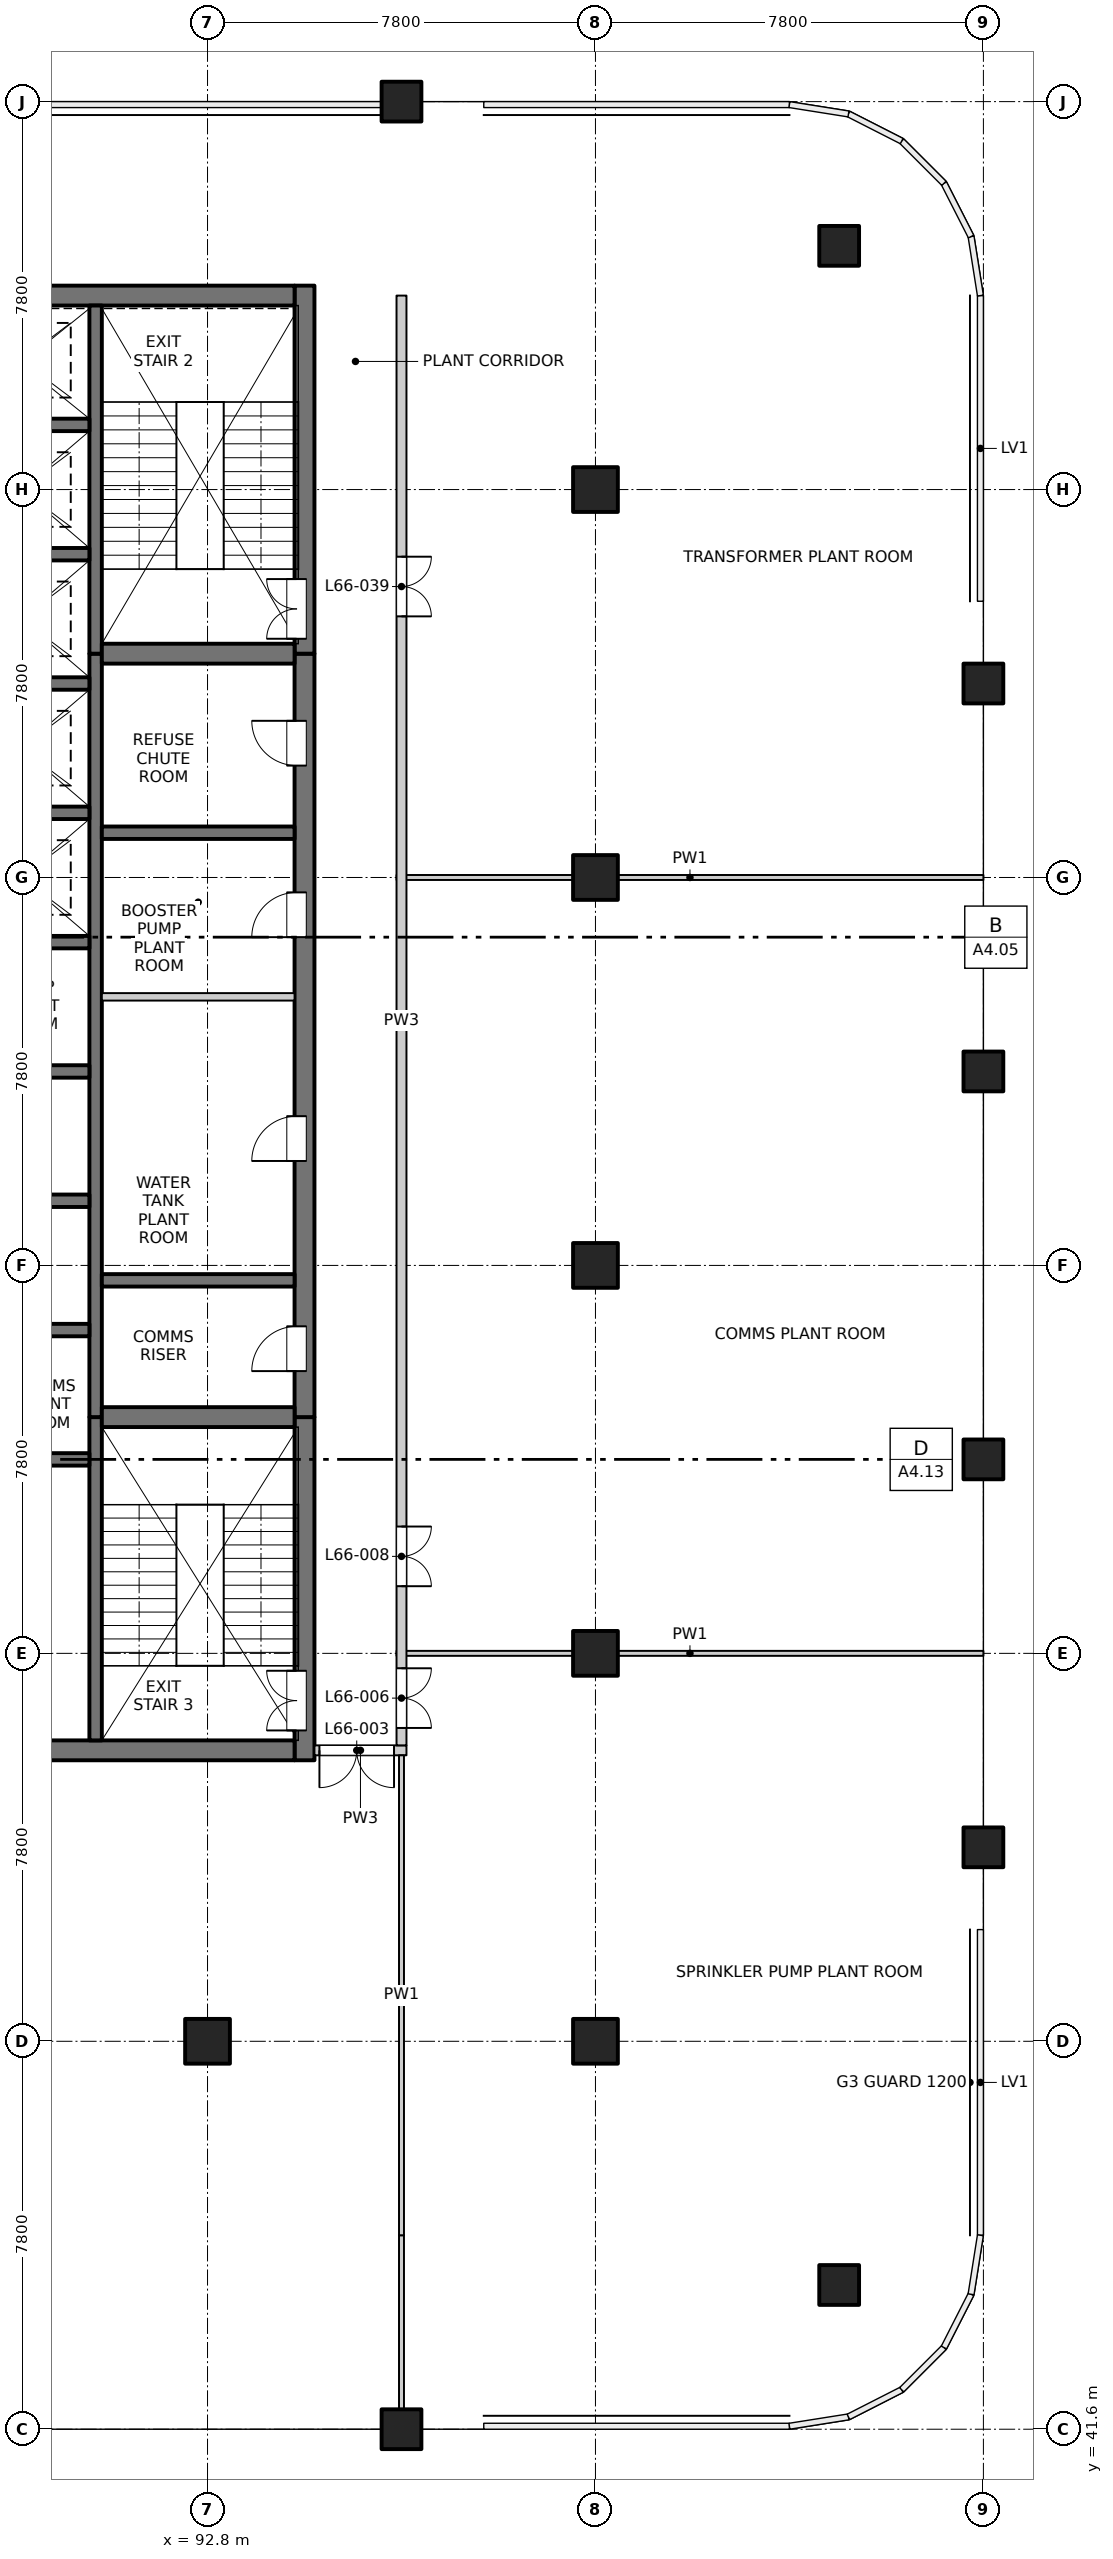
"""IFC4 building model, lengths in metres.
Left out: names, types, materials, properties, quantities, classifications, styles, units other than length and angle.
Written with IfcOpenShell. Run it as: python <this file> out.ifc"""

import sys

from ifc_helpers import new_model, si_unit, direction, frame, frame_2d, origin, origin_2d, place, context, subcontext, project, spatial, rectangle, extrude, element, fill, save


model = new_model("IFC4")
c1 = context("Model", 3, precision=1e-05, world=origin(), true_north=direction((0.0, 1.0)))
c2 = subcontext(c1, "Body", "Model", "MODEL_VIEW")
j1 = project(units=[si_unit("LENGTHUNIT", "METRE"), si_unit("PLANEANGLEUNIT", "RADIAN")], contexts=[c1])
p1 = place(None, origin())
s1 = spatial("IfcSite", under=j1, at=p1, CompositionType="ELEMENT")
p2 = place(p1, origin())
s2 = spatial("IfcBuilding", under=s1, at=p2, CompositionType="ELEMENT")
p3 = place(p2, frame((0.0, 0.0, 241.5)))
s3 = spatial("IfcBuildingStorey", under=s2, at=p3, CompositionType="ELEMENT", Elevation=241.5)
for number, where, z_axis, x_axis in (
    (1, (105.5, 44.5, -0.3), (0.0, 0.0, 1.0), (1.0, 0.0, 0.0)),
    (2, (105.5, 85.5, -0.3), (0.0, 0.0, 1.0), (1.0, 0.0, 0.0)),
    (3, (108.4, 53.3, -0.3), (0.0, 0.0, 1.0), (1.0, 0.0, 0.0)),
    (4, (108.4, 61.1, -0.3), (0.0, 0.0, 1.0), (1.0, 0.0, 0.0)),
    (5, (108.4, 68.9, -0.3), (0.0, 0.0, 1.0), (1.0, 0.0, 0.0)),
    (6, (108.4, 76.7, -0.3), (0.0, 0.0, 1.0), (1.0, 0.0, 0.0)),
    (7, (96.7, 41.6, -0.3), (0.0, 0.0, 1.0), (1.0, 0.0, 0.0)),
    (8, (96.7, 88.4, -0.3), (0.0, 0.0, 1.0), (1.0, 0.0, 0.0)),
):
    element("IfcColumn", number, at=place(p3, frame(where, z_axis=z_axis, x_axis=x_axis)), inside=s3, PredefinedType="COLUMN", context=c2, shape_type="SweptSolid", body=[
        extrude(rectangle(XDim=0.8, YDim=0.8, at=origin_2d()), origin(), (0.0, 0.0, 1.0), 4.5),
    ])
for number, where, z_axis, x_axis in (
    (9, (92.8, 49.4, -0.3), (0.0, 0.0, 1.0), (1.0, 0.0, 0.0)),
    (10, (100.6, 49.4, -0.3), (0.0, 0.0, 1.0), (1.0, 0.0, 0.0)),
    (11, (100.6, 57.2, -0.3), (0.0, 0.0, 1.0), (1.0, 0.0, 0.0)),
    (12, (100.6, 65.0, -0.3), (0.0, 0.0, 1.0), (1.0, 0.0, 0.0)),
    (13, (100.6, 72.8, -0.3), (0.0, 0.0, 1.0), (1.0, 0.0, 0.0)),
    (14, (100.6, 80.6, -0.3), (0.0, 0.0, 1.0), (1.0, 0.0, 0.0)),
):
    element("IfcColumn", number, at=place(p3, frame(where, z_axis=z_axis, x_axis=x_axis)), inside=s3, PredefinedType="COLUMN", context=c2, shape_type="SweptSolid", body=[
        extrude(rectangle(XDim=0.9, YDim=0.9, at=origin_2d()), origin(), (0.0, 0.0, 1.0), 4.5),
    ])
p4 = place(p3, frame((94.75, 55.05, -0.3), z_axis=(0.0, 0.0, 1.0), x_axis=(0.0, 1.0, 0.0)))
e15 = element("IfcWall", 15, at=p4, inside=s3, PredefinedType="SOLIDWALL", context=c2, shape_type="SweptSolid", body=[
    extrude(rectangle(XDim=6.9, YDim=0.4, at=frame_2d((3.45, 0.0))), origin(), (0.0, 0.0, 1.0), 4.5),
])
p5 = place(p4, frame((0.6, 0.0, 0.3)))
e16 = element("IfcOpeningElement", 16, at=p5, cuts=e15, PredefinedType="OPENING", context=c2, shape_type="SweptSolid", body=[
    extrude(rectangle(XDim=1.2, YDim=2.1, at=frame_2d((0.6, 1.05))), frame((0.0, 0.21, 0.0), z_axis=(0.0, -1.0, 0.0), x_axis=(1.0, 0.0, 0.0)), (0.0, 0.0, 1.0), 0.42),
])
p6 = place(p3, frame((94.75, 61.95, -0.3), z_axis=(0.0, 0.0, 1.0), x_axis=(0.0, 1.0, 0.0)))
e17 = element("IfcWall", 17, at=p6, inside=s3, PredefinedType="SOLIDWALL", context=c2, shape_type="SweptSolid", body=[
    extrude(rectangle(XDim=15.35, YDim=0.4, at=frame_2d((7.675, 0.0))), origin(), (0.0, 0.0, 1.0), 4.5),
])
p7 = place(p6, frame((0.925, 0.0, 0.3)))
e18 = element("IfcOpeningElement", 18, at=p7, cuts=e17, PredefinedType="OPENING", context=c2, shape_type="SweptSolid", body=[
    extrude(rectangle(XDim=0.9, YDim=2.1, at=frame_2d((0.45, 1.05))), frame((0.0, 0.21, 0.0), z_axis=(0.0, -1.0, 0.0), x_axis=(1.0, 0.0, 0.0)), (0.0, 0.0, 1.0), 0.42),
])
p8 = place(p6, frame((5.15, 0.0, 0.3)))
e19 = element("IfcOpeningElement", 19, at=p8, cuts=e17, PredefinedType="OPENING", context=c2, shape_type="SweptSolid", body=[
    extrude(rectangle(XDim=0.9, YDim=2.1, at=frame_2d((0.45, 1.05))), frame((0.0, 0.21, 0.0), z_axis=(0.0, -1.0, 0.0), x_axis=(1.0, 0.0, 0.0)), (0.0, 0.0, 1.0), 0.42),
])
p9 = place(p6, frame((9.65, 0.0, 0.3)))
e20 = element("IfcOpeningElement", 20, at=p9, cuts=e17, PredefinedType="OPENING", context=c2, shape_type="SweptSolid", body=[
    extrude(rectangle(XDim=0.9, YDim=2.1, at=frame_2d((0.45, 1.05))), frame((0.0, 0.21, 0.0), z_axis=(0.0, -1.0, 0.0), x_axis=(1.0, 0.0, 0.0)), (0.0, 0.0, 1.0), 0.42),
])
p10 = place(p6, frame((13.1, 0.0, 0.3)))
e21 = element("IfcOpeningElement", 21, at=p10, cuts=e17, PredefinedType="OPENING", context=c2, shape_type="SweptSolid", body=[
    extrude(rectangle(XDim=0.9, YDim=2.1, at=frame_2d((0.45, 1.05))), frame((0.0, 0.21, 0.0), z_axis=(0.0, -1.0, 0.0), x_axis=(1.0, 0.0, 0.0)), (0.0, 0.0, 1.0), 0.42),
])
p11 = place(p3, frame((94.75, 77.3, -0.3), z_axis=(0.0, 0.0, 1.0), x_axis=(0.0, 1.0, 0.0)))
e22 = element("IfcWall", 22, at=p11, inside=s3, PredefinedType="SOLIDWALL", context=c2, shape_type="SweptSolid", body=[
    extrude(rectangle(XDim=7.4, YDim=0.4, at=frame_2d((3.7, 0.0))), origin(), (0.0, 0.0, 1.0), 4.5),
])
p12 = place(p11, frame((0.3, 0.0, 0.3)))
e23 = element("IfcOpeningElement", 23, at=p12, cuts=e22, PredefinedType="OPENING", context=c2, shape_type="SweptSolid", body=[
    extrude(rectangle(XDim=1.2, YDim=2.1, at=frame_2d((0.6, 1.05))), frame((0.0, 0.21, 0.0), z_axis=(0.0, -1.0, 0.0), x_axis=(1.0, 0.0, 0.0)), (0.0, 0.0, 1.0), 0.42),
])
p13 = place(p3, frame((75.45, 55.25, -0.3), z_axis=(0.0, 0.0, 1.0), x_axis=(1.0, 0.0, 0.0)))
e24 = element("IfcWall", 24, at=p13, inside=s3, PredefinedType="SOLIDWALL", context=c2, shape_type="SweptSolid", body=[
    extrude(rectangle(XDim=19.1, YDim=0.4, at=frame_2d((9.55, 0.0))), origin(), (0.0, 0.0, 1.0), 4.5),
])
p14 = place(p13, frame((7.3, 0.0, 0.3)))
e25 = element("IfcOpeningElement", 25, at=p14, cuts=e24, PredefinedType="OPENING", context=c2, shape_type="SweptSolid", body=[
    extrude(rectangle(XDim=1.5, YDim=2.1, at=frame_2d((0.75, 1.05))), frame((0.0, 0.21, 0.0), z_axis=(0.0, -1.0, 0.0), x_axis=(1.0, 0.0, 0.0)), (0.0, 0.0, 1.0), 0.42),
])
p15 = place(p3, frame((75.45, 84.5, -0.3), z_axis=(0.0, 0.0, 1.0), x_axis=(1.0, 0.0, 0.0)))
e26 = element("IfcWall", 26, at=p15, inside=s3, PredefinedType="SOLIDWALL", context=c2, shape_type="SweptSolid", body=[
    extrude(rectangle(XDim=19.1, YDim=0.4, at=frame_2d((9.55, 0.0))), origin(), (0.0, 0.0, 1.0), 4.5),
])
p16 = place(p3, frame((90.55, 55.45, -0.3), z_axis=(0.0, 0.0, 1.0), x_axis=(0.0, 1.0, 0.0)))
e27 = element("IfcWall", 27, at=p16, inside=s3, PredefinedType="SOLIDWALL", context=c2, shape_type="SweptSolid", body=[
    extrude(rectangle(XDim=6.5, YDim=0.25, at=frame_2d((3.25, 0.0))), origin(), (0.0, 0.0, 1.0), 4.5),
])
p17 = place(p3, frame((90.55, 61.95, -0.3), z_axis=(0.0, 0.0, 1.0), x_axis=(0.0, 1.0, 0.0)))
e28 = element("IfcWall", 28, at=p17, inside=s3, PredefinedType="SOLIDWALL", context=c2, shape_type="SweptSolid", body=[
    extrude(rectangle(XDim=15.35, YDim=0.25, at=frame_2d((7.675, 0.0))), origin(), (0.0, 0.0, 1.0), 4.5),
])
p18 = place(p3, frame((90.55, 77.3, -0.3), z_axis=(0.0, 0.0, 1.0), x_axis=(0.0, 1.0, 0.0)))
e29 = element("IfcWall", 29, at=p18, inside=s3, PredefinedType="SOLIDWALL", context=c2, shape_type="SweptSolid", body=[
    extrude(rectangle(XDim=7.0, YDim=0.25, at=frame_2d((3.5, 0.0))), origin(), (0.0, 0.0, 1.0), 4.5),
])
for number, where, z_axis, x_axis in (
    (30, (87.425, 61.1, -0.3), (0.0, 0.0, 1.0), (1.0, 0.0, 0.0)),
    (31, (87.425, 63.7, -0.3), (0.0, 0.0, 1.0), (1.0, 0.0, 0.0)),
    (32, (87.425, 66.3, -0.3), (0.0, 0.0, 1.0), (1.0, 0.0, 0.0)),
    (33, (87.425, 68.9, -0.3), (0.0, 0.0, 1.0), (1.0, 0.0, 0.0)),
    (34, (87.425, 71.5, -0.3), (0.0, 0.0, 1.0), (1.0, 0.0, 0.0)),
    (35, (87.425, 74.1, -0.3), (0.0, 0.0, 1.0), (1.0, 0.0, 0.0)),
    (36, (87.425, 76.7, -0.3), (0.0, 0.0, 1.0), (1.0, 0.0, 0.0)),
    (37, (87.425, 79.3, -0.3), (0.0, 0.0, 1.0), (1.0, 0.0, 0.0)),
    (38, (87.425, 81.9, -0.3), (0.0, 0.0, 1.0), (1.0, 0.0, 0.0)),
):
    element("IfcWall", number, at=place(p3, frame(where, z_axis=z_axis, x_axis=x_axis)), inside=s3, PredefinedType="SOLIDWALL", context=c2, shape_type="SweptSolid", body=[
        extrude(rectangle(XDim=3.0, YDim=0.25, at=frame_2d((1.5, 0.0))), origin(), (0.0, 0.0, 1.0), 4.5),
    ])
p19 = place(p3, frame((90.675, 61.95, -0.3), z_axis=(0.0, 0.0, 1.0), x_axis=(1.0, 0.0, 0.0)))
e39 = element("IfcWall", 39, at=p19, inside=s3, PredefinedType="SOLIDWALL", context=c2, shape_type="SweptSolid", body=[
    extrude(rectangle(XDim=3.875, YDim=0.4, at=frame_2d((1.938, 0.0))), origin(), (0.0, 0.0, 1.0), 4.5),
])
for number, where, z_axis, x_axis in (
    (40, (90.675, 64.7, -0.3), (0.0, 0.0, 1.0), (1.0, 0.0, 0.0)),
    (41, (90.675, 73.7, -0.3), (0.0, 0.0, 1.0), (1.0, 0.0, 0.0)),
):
    element("IfcWall", number, at=place(p3, frame(where, z_axis=z_axis, x_axis=x_axis)), inside=s3, PredefinedType="SOLIDWALL", context=c2, shape_type="SweptSolid", body=[
        extrude(rectangle(XDim=3.875, YDim=0.25, at=frame_2d((1.938, 0.0))), origin(), (0.0, 0.0, 1.0), 4.5),
    ])
p20 = place(p3, frame((90.675, 77.3, -0.3), z_axis=(0.0, 0.0, 1.0), x_axis=(1.0, 0.0, 0.0)))
e42 = element("IfcWall", 42, at=p20, inside=s3, PredefinedType="SOLIDWALL", context=c2, shape_type="SweptSolid", body=[
    extrude(rectangle(XDim=3.875, YDim=0.4, at=frame_2d((1.938, 0.0))), origin(), (0.0, 0.0, 1.0), 4.5),
])
p21 = place(p3, frame((94.95, 55.25, 0.0), z_axis=(0.0, 0.0, 1.0), x_axis=(1.0, 0.0, 0.0)))
e43 = element("IfcWall", 43, at=p21, inside=s3, PredefinedType="PARTITIONING", context=c2, shape_type="SweptSolid", body=[
    extrude(rectangle(XDim=1.85, YDim=0.2, at=frame_2d((0.925, 0.0))), origin(), (0.0, 0.0, 1.0), 4.2),
])
p22 = place(p21, frame((0.1, 0.0, 0.0)))
e44 = element("IfcOpeningElement", 44, at=p22, cuts=e43, PredefinedType="OPENING", context=c2, shape_type="SweptSolid", body=[
    extrude(rectangle(XDim=1.5, YDim=2.1, at=frame_2d((0.75, 1.05))), frame((0.0, 0.11, 0.0), z_axis=(0.0, -1.0, 0.0), x_axis=(1.0, 0.0, 0.0)), (0.0, 0.0, 1.0), 0.22),
])
p23 = place(p3, frame((96.6, 57.2, 0.0), z_axis=(0.0, 0.0, 1.0), x_axis=(1.0, 0.0, 0.0)))
e45 = element("IfcWall", 45, at=p23, inside=s3, PredefinedType="PARTITIONING", context=c2, shape_type="SweptSolid", body=[
    extrude(rectangle(XDim=11.8, YDim=0.1, at=frame_2d((5.9, 0.0))), origin(), (0.0, 0.0, 1.0), 4.2),
])
p24 = place(p3, frame((90.675, 70.4, 0.0), z_axis=(0.0, 0.0, 1.0), x_axis=(1.0, 0.0, 0.0)))
e46 = element("IfcWall", 46, at=p24, inside=s3, PredefinedType="PARTITIONING", context=c2, shape_type="SweptSolid", body=[
    extrude(rectangle(XDim=3.875, YDim=0.15, at=frame_2d((1.938, 0.0))), origin(), (0.0, 0.0, 1.0), 4.2),
])
p25 = place(p3, frame((96.6, 72.8, 0.0), z_axis=(0.0, 0.0, 1.0), x_axis=(1.0, 0.0, 0.0)))
e47 = element("IfcWall", 47, at=p25, inside=s3, PredefinedType="PARTITIONING", context=c2, shape_type="SweptSolid", body=[
    extrude(rectangle(XDim=11.8, YDim=0.1, at=frame_2d((5.9, 0.0))), origin(), (0.0, 0.0, 1.0), 4.2),
])
p26 = place(p3, frame((96.7, 41.6, 0.0), z_axis=(0.0, 0.0, 1.0), x_axis=(0.0, 1.0, 0.0)))
e48 = element("IfcWall", 48, at=p26, inside=s3, PredefinedType="PARTITIONING", context=c2, shape_type="SweptSolid", body=[
    extrude(rectangle(XDim=3.9, YDim=0.1, at=frame_2d((1.95, 0.0))), origin(), (0.0, 0.0, 1.0), 2.6),
])
p27 = place(p3, frame((96.7, 45.5, 0.0), z_axis=(0.0, 0.0, 1.0), x_axis=(0.0, 1.0, 0.0)))
e49 = element("IfcWall", 49, at=p27, inside=s3, PredefinedType="PARTITIONING", context=c2, shape_type="SweptSolid", body=[
    extrude(rectangle(XDim=9.65, YDim=0.1, at=frame_2d((4.825, 0.0))), origin(), (0.0, 0.0, 1.0), 4.2),
])
p28 = place(p3, frame((96.7, 55.35, 0.0), z_axis=(0.0, 0.0, 1.0), x_axis=(0.0, 1.0, 0.0)))
e50 = element("IfcWall", 50, at=p28, inside=s3, PredefinedType="PARTITIONING", context=c2, shape_type="SweptSolid", body=[
    extrude(rectangle(XDim=29.15, YDim=0.2, at=frame_2d((14.575, 0.0))), origin(), (0.0, 0.0, 1.0), 4.2),
])
p29 = place(p28, frame((0.35, 0.0, 0.0)))
e51 = element("IfcOpeningElement", 51, at=p29, cuts=e50, PredefinedType="OPENING", context=c2, shape_type="SweptSolid", body=[
    extrude(rectangle(XDim=1.2, YDim=2.1, at=frame_2d((0.6, 1.05))), frame((0.0, 0.11, 0.0), z_axis=(0.0, -1.0, 0.0), x_axis=(1.0, 0.0, 0.0)), (0.0, 0.0, 1.0), 0.22),
])
p30 = place(p28, frame((3.2, 0.0, 0.0)))
e52 = element("IfcOpeningElement", 52, at=p30, cuts=e50, PredefinedType="OPENING", context=c2, shape_type="SweptSolid", body=[
    extrude(rectangle(XDim=1.2, YDim=2.1, at=frame_2d((0.6, 1.05))), frame((0.0, 0.11, 0.0), z_axis=(0.0, -1.0, 0.0), x_axis=(1.0, 0.0, 0.0)), (0.0, 0.0, 1.0), 0.22),
])
p31 = place(p28, frame((22.7, 0.0, 0.0)))
e53 = element("IfcOpeningElement", 53, at=p31, cuts=e50, PredefinedType="OPENING", context=c2, shape_type="SweptSolid", body=[
    extrude(rectangle(XDim=1.2, YDim=2.1, at=frame_2d((0.6, 1.05))), frame((0.0, 0.11, 0.0), z_axis=(0.0, -1.0, 0.0), x_axis=(1.0, 0.0, 0.0)), (0.0, 0.0, 1.0), 0.22),
])
p32 = place(p22, origin())
e54 = element("IfcDoor", 54, at=p32, inside=s3, OperationType="DOUBLE_DOOR_SINGLE_SWING", PredefinedType="DOOR", context=c2, shape_type="SweptSolid", body=[
    extrude(rectangle(XDim=1.5, YDim=2.1, at=frame_2d((0.75, 1.05))), frame((0.0, 0.025, 0.0), z_axis=(0.0, -1.0, 0.0), x_axis=(1.0, 0.0, 0.0)), (0.0, 0.0, 1.0), 0.05),
])
fill(e44, e54)
p33 = place(p5, origin())
e55 = element("IfcDoor", 55, at=p33, inside=s3, OperationType="DOUBLE_DOOR_SINGLE_SWING", PredefinedType="DOOR", context=c2, shape_type="SweptSolid", body=[
    extrude(rectangle(XDim=1.2, YDim=2.1, at=frame_2d((0.6, 1.05))), frame((0.0, 0.185, 0.0), z_axis=(0.0, -1.0, 0.0), x_axis=(1.0, 0.0, 0.0)), (0.0, 0.0, 1.0), 0.05),
])
fill(e16, e55)
p34 = place(p29, origin())
e56 = element("IfcDoor", 56, at=p34, inside=s3, OperationType="DOUBLE_DOOR_SINGLE_SWING", PredefinedType="DOOR", context=c2, shape_type="SweptSolid", body=[
    extrude(rectangle(XDim=1.2, YDim=2.1, at=frame_2d((0.6, 1.05))), frame((0.0, 0.025, 0.0), z_axis=(0.0, -1.0, 0.0), x_axis=(1.0, 0.0, 0.0)), (0.0, 0.0, 1.0), 0.05),
])
fill(e51, e56)
p35 = place(p30, origin())
e57 = element("IfcDoor", 57, at=p35, inside=s3, OperationType="DOUBLE_DOOR_SINGLE_SWING", PredefinedType="DOOR", context=c2, shape_type="SweptSolid", body=[
    extrude(rectangle(XDim=1.2, YDim=2.1, at=frame_2d((0.6, 1.05))), frame((0.0, 0.025, 0.0), z_axis=(0.0, -1.0, 0.0), x_axis=(1.0, 0.0, 0.0)), (0.0, 0.0, 1.0), 0.05),
])
fill(e52, e57)
p36 = place(p7, origin())
e58 = element("IfcDoor", 58, at=p36, inside=s3, OperationType="SINGLE_SWING_LEFT", PredefinedType="DOOR", context=c2, shape_type="SweptSolid", body=[
    extrude(rectangle(XDim=0.9, YDim=2.1, at=frame_2d((0.45, 1.05))), frame((0.0, 0.185, 0.0), z_axis=(0.0, -1.0, 0.0), x_axis=(1.0, 0.0, 0.0)), (0.0, 0.0, 1.0), 0.05),
])
fill(e18, e58)
p37 = place(p8, origin())
e59 = element("IfcDoor", 59, at=p37, inside=s3, OperationType="SINGLE_SWING_LEFT", PredefinedType="DOOR", context=c2, shape_type="SweptSolid", body=[
    extrude(rectangle(XDim=0.9, YDim=2.1, at=frame_2d((0.45, 1.05))), frame((0.0, 0.185, 0.0), z_axis=(0.0, -1.0, 0.0), x_axis=(1.0, 0.0, 0.0)), (0.0, 0.0, 1.0), 0.05),
])
fill(e19, e59)
p38 = place(p9, origin())
e60 = element("IfcDoor", 60, at=p38, inside=s3, OperationType="SINGLE_SWING_LEFT", PredefinedType="DOOR", context=c2, shape_type="SweptSolid", body=[
    extrude(rectangle(XDim=0.9, YDim=2.1, at=frame_2d((0.45, 1.05))), frame((0.0, 0.185, 0.0), z_axis=(0.0, -1.0, 0.0), x_axis=(1.0, 0.0, 0.0)), (0.0, 0.0, 1.0), 0.05),
])
fill(e20, e60)
p39 = place(p10, origin())
e61 = element("IfcDoor", 61, at=p39, inside=s3, OperationType="SINGLE_SWING_RIGHT", PredefinedType="DOOR", context=c2, shape_type="SweptSolid", body=[
    extrude(rectangle(XDim=0.9, YDim=2.1, at=frame_2d((0.45, 1.05))), frame((0.0, 0.185, 0.0), z_axis=(0.0, -1.0, 0.0), x_axis=(1.0, 0.0, 0.0)), (0.0, 0.0, 1.0), 0.05),
])
fill(e21, e61)
p40 = place(p12, origin())
e62 = element("IfcDoor", 62, at=p40, inside=s3, OperationType="DOUBLE_DOOR_SINGLE_SWING", PredefinedType="DOOR", context=c2, shape_type="SweptSolid", body=[
    extrude(rectangle(XDim=1.2, YDim=2.1, at=frame_2d((0.6, 1.05))), frame((0.0, 0.185, 0.0), z_axis=(0.0, -1.0, 0.0), x_axis=(1.0, 0.0, 0.0)), (0.0, 0.0, 1.0), 0.05),
])
fill(e23, e62)
p41 = place(p31, origin())
e63 = element("IfcDoor", 63, at=p41, inside=s3, OperationType="DOUBLE_DOOR_SINGLE_SWING", PredefinedType="DOOR", context=c2, shape_type="SweptSolid", body=[
    extrude(rectangle(XDim=1.2, YDim=2.1, at=frame_2d((0.6, 1.05))), frame((0.0, 0.025, 0.0), z_axis=(0.0, -1.0, 0.0), x_axis=(1.0, 0.0, 0.0)), (0.0, 0.0, 1.0), 0.05),
])
fill(e53, e63)
save(model, sys.argv[1])
